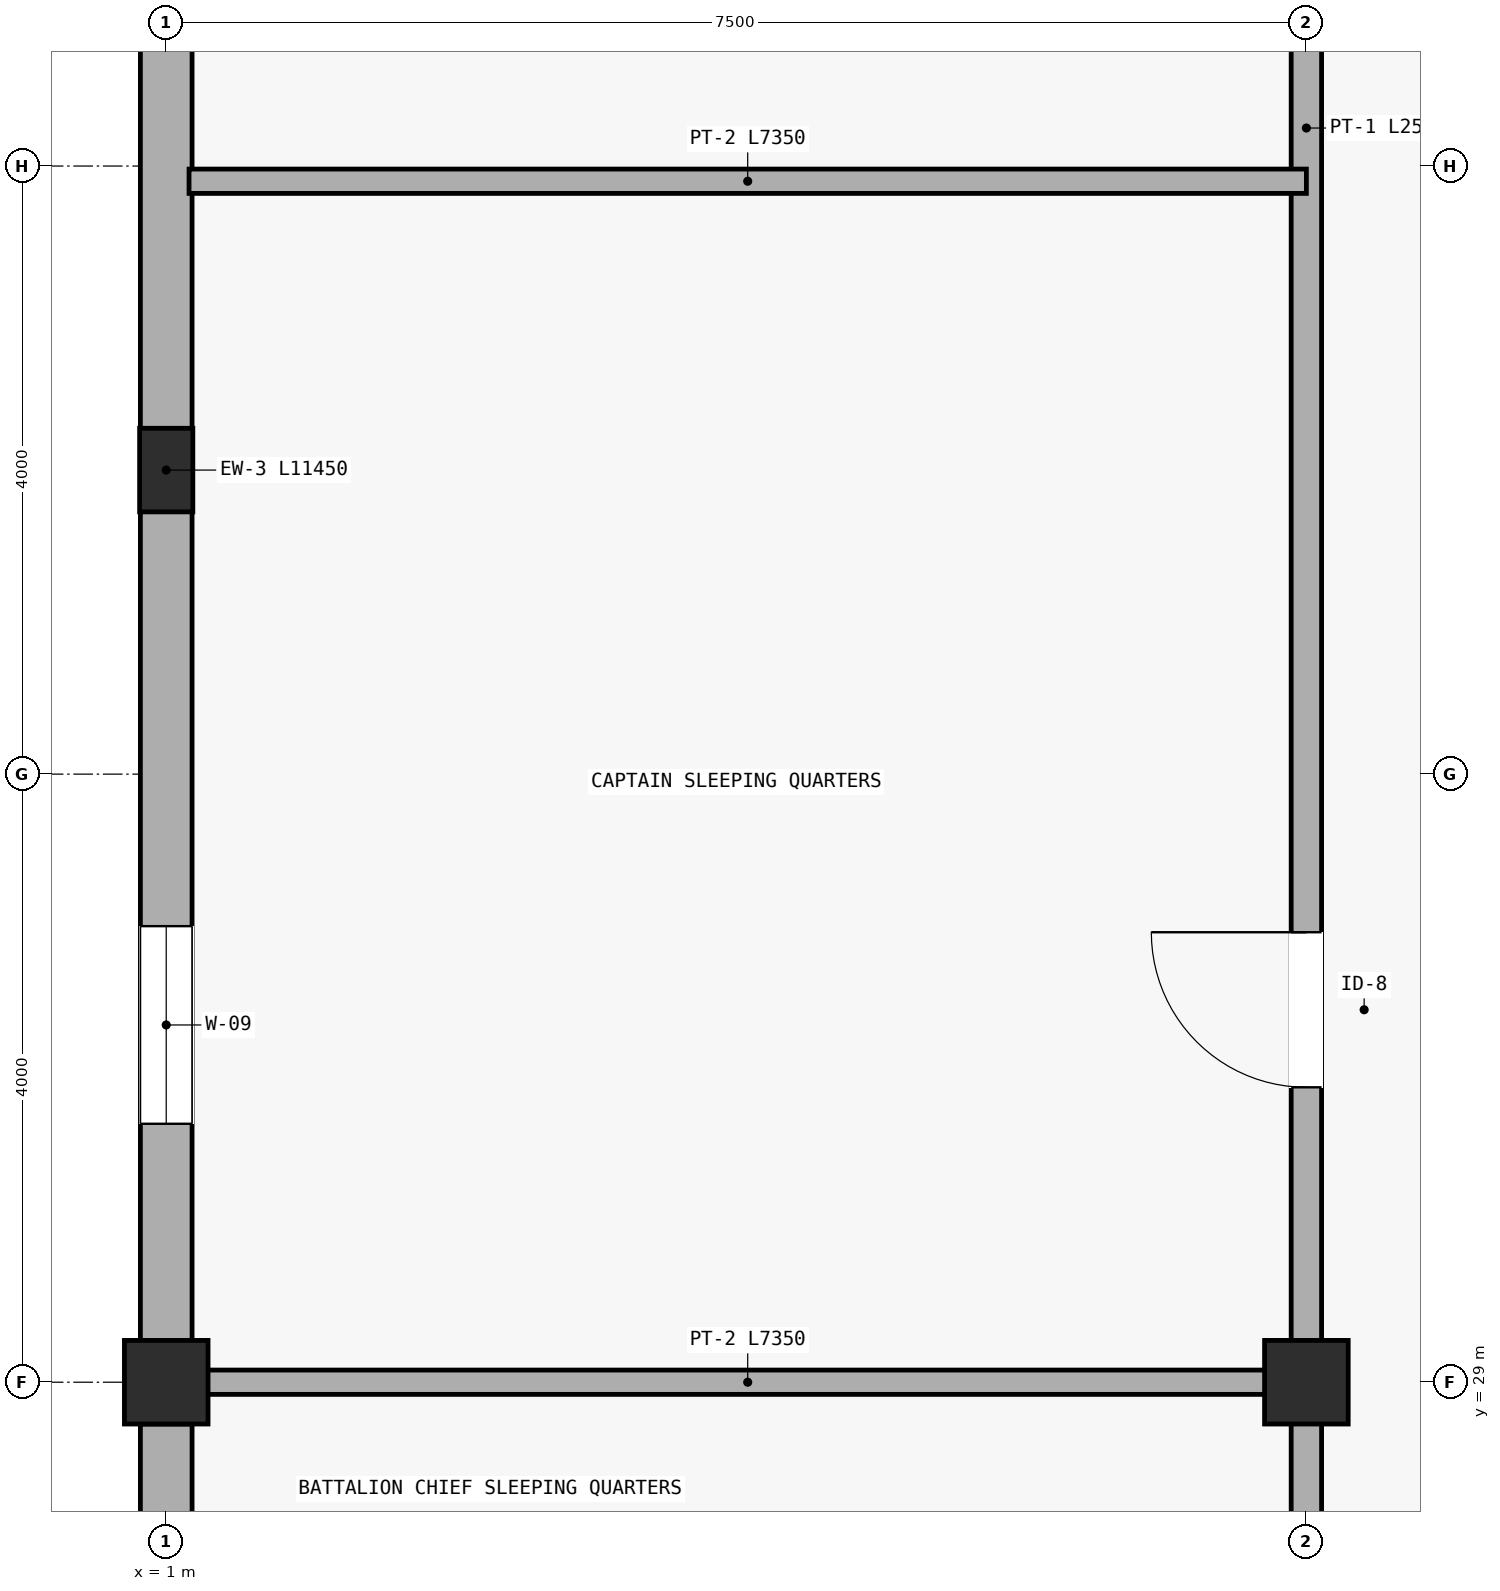
"""IFC4 building model, lengths in metres.
Left out: names, types, materials, properties, quantities, classifications, styles, units other than length and angle.
Written with IfcOpenShell. Run it as: python <this file> out.ifc"""

import sys

from ifc_helpers import new_model, si_unit, direction, frame, frame_2d, origin, origin_2d, place, context, subcontext, project, spatial, rectangle, extrude, element, fill, save


model = new_model("IFC4")
c1 = context("Model", 3, precision=1e-05, world=origin(), true_north=direction((0.0, 1.0)))
c2 = subcontext(c1, "Body", "Model", "MODEL_VIEW")
j1 = project(units=[si_unit("LENGTHUNIT", "METRE"), si_unit("PLANEANGLEUNIT", "RADIAN")], contexts=[c1])
p1 = place(None, origin())
s1 = spatial("IfcSite", under=j1, at=p1, CompositionType="ELEMENT")
p2 = place(p1, origin())
s2 = spatial("IfcBuilding", under=s1, at=p2, CompositionType="ELEMENT")
p3 = place(p2, frame((0.0, 0.0, 9.3)))
s3 = spatial("IfcBuildingStorey", under=s2, at=p3, CompositionType="ELEMENT", Elevation=9.3)
for number, where, z_axis, x_axis in (
    (1, (1.0, 29.0, 0.0), (0.0, 0.0, 1.0), (1.0, 0.0, 0.0)),
    (2, (8.5, 29.0, 0.0), (0.0, 0.0, 1.0), (1.0, 0.0, 0.0)),
):
    element("IfcColumn", number, at=place(p3, frame(where, z_axis=z_axis, x_axis=x_axis)), inside=s3, PredefinedType="COLUMN", context=c2, shape_type="SweptSolid", body=[
        extrude(rectangle(XDim=0.55, YDim=0.55, at=origin_2d()), origin(), (0.0, 0.0, 1.0), 3.45),
    ])
p4 = place(p3, frame((1.0, 35.0, 0.0), z_axis=(0.0, 0.0, 1.0), x_axis=(1.0, 0.0, 0.0)))
e3 = element("IfcColumn", 3, at=p4, inside=s3, PredefinedType="PILASTER", context=c2, shape_type="SweptSolid", body=[
    extrude(rectangle(XDim=0.35, YDim=0.55, at=origin_2d()), origin(), (0.0, 0.0, 1.0), 3.45),
])
p5 = place(p3, frame((1.0, 28.725, 0.0), z_axis=(0.0, 0.0, 1.0), x_axis=(0.0, -1.0, 0.0)))
e4 = element("IfcWall", 4, at=p5, inside=s3, PredefinedType="STANDARD", context=c2, shape_type="SweptSolid", body=[
    extrude(rectangle(XDim=10.95, YDim=0.34, at=frame_2d((5.475, 0.0))), origin(), (0.0, 0.0, 1.0), 2.75),
])
p6 = place(p5, frame((1.525, 0.0, 0.7)))
e5 = element("IfcOpeningElement", 5, at=p6, cuts=e4, PredefinedType="OPENING", context=c2, shape_type="SweptSolid", body=[
    extrude(rectangle(XDim=0.88, YDim=1.5, at=frame_2d((0.44, 0.75))), frame((0.0, 0.18, 0.0), z_axis=(0.0, -1.0, 0.0), x_axis=(1.0, 0.0, 0.0)), (0.0, 0.0, 1.0), 0.36),
])
p7 = place(p5, frame((8.225, 0.0, 0.7)))
e6 = element("IfcOpeningElement", 6, at=p7, cuts=e4, PredefinedType="OPENING", context=c2, shape_type="SweptSolid", body=[
    extrude(rectangle(XDim=1.3, YDim=1.4, at=frame_2d((0.65, 0.7))), frame((0.0, 0.18, 0.0), z_axis=(0.0, -1.0, 0.0), x_axis=(1.0, 0.0, 0.0)), (0.0, 0.0, 1.0), 0.36),
])
p8 = place(p3, frame((1.0, 40.725, 0.0), z_axis=(0.0, 0.0, 1.0), x_axis=(0.0, -1.0, 0.0)))
e7 = element("IfcWall", 7, at=p8, inside=s3, PredefinedType="STANDARD", context=c2, shape_type="SweptSolid", body=[
    extrude(rectangle(XDim=11.45, YDim=0.34, at=frame_2d((5.725, 0.0))), origin(), (0.0, 0.0, 1.0), 2.75),
])
p9 = place(p8, frame((1.525, 0.0, 0.7)))
e8 = element("IfcOpeningElement", 8, at=p9, cuts=e7, PredefinedType="OPENING", context=c2, shape_type="SweptSolid", body=[
    extrude(rectangle(XDim=0.88, YDim=1.5, at=frame_2d((0.44, 0.75))), frame((0.0, 0.18, 0.0), z_axis=(0.0, -1.0, 0.0), x_axis=(1.0, 0.0, 0.0)), (0.0, 0.0, 1.0), 0.36),
])
p10 = place(p8, frame((8.725, 0.0, 0.7)))
e9 = element("IfcOpeningElement", 9, at=p10, cuts=e7, PredefinedType="OPENING", context=c2, shape_type="SweptSolid", body=[
    extrude(rectangle(XDim=1.3, YDim=1.4, at=frame_2d((0.65, 0.7))), frame((0.0, 0.18, 0.0), z_axis=(0.0, -1.0, 0.0), x_axis=(1.0, 0.0, 0.0)), (0.0, 0.0, 1.0), 0.36),
])
p11 = place(p3, frame((8.5, 27.74, 0.0), z_axis=(0.0, 0.0, 1.0), x_axis=(0.0, 1.0, 0.0)))
e10 = element("IfcWall", 10, at=p11, inside=s3, PredefinedType="PARTITIONING", context=c2, shape_type="SweptSolid", body=[
    extrude(rectangle(XDim=13.26, YDim=0.2, at=frame_2d((6.63, 0.0))), origin(), (0.0, 0.0, 1.0), 2.7),
])
p12 = place(p11, frame((3.2, 0.0, 0.0)))
e11 = element("IfcOpeningElement", 11, at=p12, cuts=e10, PredefinedType="OPENING", context=c2, shape_type="SweptSolid", body=[
    extrude(rectangle(XDim=1.02, YDim=2.14, at=frame_2d((0.51, 1.07))), frame((0.0, 0.11, 0.0), z_axis=(0.0, -1.0, 0.0), x_axis=(1.0, 0.0, 0.0)), (0.0, 0.0, 1.0), 0.22),
])
for number, where, z_axis, x_axis in (
    (12, (1.15, 29.0, 0.0), (0.0, 0.0, 1.0), (1.0, 0.0, 0.0)),
    (13, (1.15, 36.9, 0.0), (0.0, 0.0, 1.0), (1.0, 0.0, 0.0)),
):
    element("IfcWall", number, at=place(p3, frame(where, z_axis=z_axis, x_axis=x_axis)), inside=s3, PredefinedType="PARTITIONING", context=c2, shape_type="SweptSolid", body=[
        extrude(rectangle(XDim=7.35, YDim=0.16, at=frame_2d((3.675, 0.0))), origin(), (0.0, 0.0, 1.0), 2.7),
    ])
p13 = place(p10, origin())
e14 = element("IfcWindow", 14, at=p13, inside=s3, PartitioningType="SINGLE_PANEL", PredefinedType="WINDOW", context=c2, shape_type="SweptSolid", body=[
    extrude(rectangle(XDim=1.3, YDim=1.4, at=frame_2d((0.65, 0.7))), frame((0.0, 0.03, 0.0), z_axis=(0.0, -1.0, 0.0), x_axis=(1.0, 0.0, 0.0)), (0.0, 0.0, 1.0), 0.06),
])
fill(e9, e14)
p14 = place(p12, origin())
e15 = element("IfcDoor", 15, at=p14, inside=s3, OperationType="SINGLE_SWING_RIGHT", PredefinedType="DOOR", context=c2, shape_type="SweptSolid", body=[
    extrude(rectangle(XDim=1.02, YDim=2.14, at=frame_2d((0.51, 1.07))), frame((0.0, 0.025, 0.0), z_axis=(0.0, -1.0, 0.0), x_axis=(1.0, 0.0, 0.0)), (0.0, 0.0, 1.0), 0.05),
])
fill(e11, e15)
save(model, sys.argv[1])
